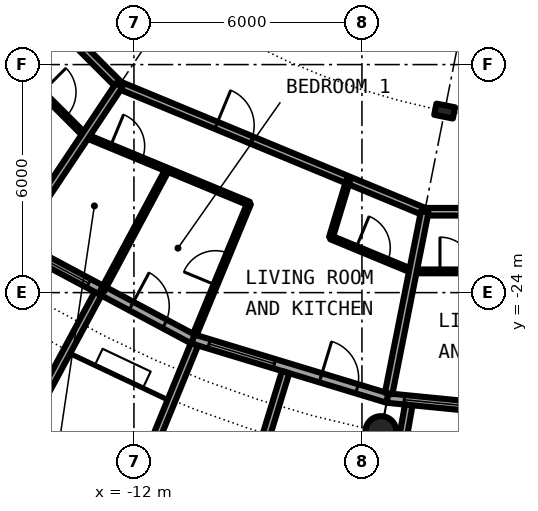
"""IFC4 building model, lengths in metres.
Left out: names, types, materials, properties, quantities, classifications, styles, units other than length and angle.
Written with IfcOpenShell. Run it as: python <this file> out.ifc"""

import sys

from ifc_helpers import new_model, si_unit, direction, frame, frame_2d, origin, origin_2d, place, context, subcontext, project, spatial, rectangle, hollow_circle, i_section, extrude, element, fill, save


model = new_model("IFC4")
c1 = context("Model", 3, precision=1e-05, world=origin(), true_north=direction((0.0, 1.0)))
c2 = subcontext(c1, "Body", "Model", "MODEL_VIEW")
j1 = project(units=[si_unit("LENGTHUNIT", "METRE"), si_unit("PLANEANGLEUNIT", "RADIAN")], contexts=[c1])
p1 = place(None, origin())
s1 = spatial("IfcSite", under=j1, at=p1, CompositionType="ELEMENT")
p2 = place(p1, origin())
s2 = spatial("IfcBuilding", under=s1, at=p2, CompositionType="ELEMENT")
p3 = place(p2, frame((0.0, 0.0, 167.7)))
s3 = spatial("IfcBuildingStorey", under=s2, at=p3, CompositionType="ELEMENT", Elevation=167.7)
p4 = place(p3, frame((-5.501, -27.658, 0.0), z_axis=(0.0, 0.0, 1.0), x_axis=(1.0, 0.0, 0.0)))
e1 = element("IfcColumn", 1, at=p4, inside=s3, PredefinedType="COLUMN", context=c2, shape_type="SweptSolid", body=[
    extrude(hollow_circle(Radius=0.406, WallThickness=0.04, at=origin_2d()), origin(), (0.0, 0.0, 1.0), 3.05),
])
p5 = place(p3, frame((-3.824, -19.223, 0.0), z_axis=(0.0, 0.0, 1.0), x_axis=(-0.195090322016, -0.980785280403, 0.0)))
e2 = element("IfcColumn", 2, at=p5, inside=s3, PredefinedType="COLUMN", context=c2, shape_type="SweptSolid", body=[
    extrude(i_section(OverallWidth=0.3, OverallDepth=0.5, WebThickness=0.014, FlangeThickness=0.028, FilletRadius=0.027, at=origin_2d()), origin(), (0.0, 0.0, 1.0), 3.05),
])
p6 = place(p3, frame((-15.167, -22.699, 0.0), z_axis=(0.0, 0.0, 1.0), x_axis=(0.881915646801, -0.471407246368, 0.0)))
e3 = element("IfcWall", 3, at=p6, inside=s3, PredefinedType="SOLIDWALL", context=c2, shape_type="SweptSolid", body=[
    extrude(rectangle(XDim=5.352, YDim=0.25, at=frame_2d((2.676, 0.0))), origin(), (0.0, 0.0, 1.0), 2.7),
])
p7 = place(p6, frame((0.441, 0.0, 0.3)))
e4 = element("IfcOpeningElement", 4, at=p7, cuts=e3, PredefinedType="OPENING", context=c2, shape_type="SweptSolid", body=[
    extrude(rectangle(XDim=1.8, YDim=2.1, at=frame_2d((0.9, 1.05))), frame((0.0, 0.135, 0.0), z_axis=(0.0, -1.0, 0.0), x_axis=(1.0, 0.0, 0.0)), (0.0, 0.0, 1.0), 0.27),
])
p8 = place(p6, frame((3.51, 0.0, 0.0)))
e5 = element("IfcOpeningElement", 5, at=p8, cuts=e3, PredefinedType="OPENING", context=c2, shape_type="SweptSolid", body=[
    extrude(rectangle(XDim=1.0, YDim=2.2, at=frame_2d((0.5, 1.1))), frame((0.0, 0.135, 0.0), z_axis=(0.0, -1.0, 0.0), x_axis=(1.0, 0.0, 0.0)), (0.0, 0.0, 1.0), 0.27),
])
p9 = place(p3, frame((-12.945, -24.029, -0.03), z_axis=(0.0, 0.0, 1.0), x_axis=(-0.474424310775, -0.88029629861, 0.0)))
e6 = element("IfcWall", 6, at=p9, inside=s3, PredefinedType="SOLIDWALL", context=c2, shape_type="SweptSolid", body=[
    extrude(rectangle(XDim=3.006, YDim=0.2, at=frame_2d((1.503, 0.0))), origin(), (0.0, 0.0, 1.0), 2.73),
])
p10 = place(p3, frame((-10.447, -25.222, 0.0), z_axis=(0.0, 0.0, 1.0), x_axis=(0.956965678721, -0.290201119486, 0.0)))
e7 = element("IfcWall", 7, at=p10, inside=s3, PredefinedType="SOLIDWALL", context=c2, shape_type="SweptSolid", body=[
    extrude(rectangle(XDim=5.351, YDim=0.25, at=frame_2d((2.676, 0.0))), origin(), (0.0, 0.0, 1.0), 2.7),
])
p11 = place(p10, frame((0.441, 0.0, 0.3)))
e8 = element("IfcOpeningElement", 8, at=p11, cuts=e7, PredefinedType="OPENING", context=c2, shape_type="SweptSolid", body=[
    extrude(rectangle(XDim=1.8, YDim=2.1, at=frame_2d((0.9, 1.05))), frame((0.0, 0.135, 0.0), z_axis=(0.0, -1.0, 0.0), x_axis=(1.0, 0.0, 0.0)), (0.0, 0.0, 1.0), 0.27),
])
p12 = place(p10, frame((3.51, 0.0, 0.0)))
e9 = element("IfcOpeningElement", 9, at=p12, cuts=e7, PredefinedType="OPENING", context=c2, shape_type="SweptSolid", body=[
    extrude(rectangle(XDim=1.0, YDim=2.2, at=frame_2d((0.5, 1.1))), frame((0.0, 0.135, 0.0), z_axis=(0.0, -1.0, 0.0), x_axis=(1.0, 0.0, 0.0)), (0.0, 0.0, 1.0), 0.27),
])
p13 = place(p3, frame((-10.409, -25.364, -0.03), z_axis=(0.0, 0.0, 1.0), x_axis=(-0.379509886562, -0.925187681501, 0.0)))
e10 = element("IfcWall", 10, at=p13, inside=s3, PredefinedType="SOLIDWALL", context=c2, shape_type="SweptSolid", body=[
    extrude(rectangle(XDim=2.883, YDim=0.2, at=frame_2d((1.441, 0.0))), origin(), (0.0, 0.0, 1.0), 2.73),
])
p14 = place(p3, frame((-8.009, -26.092, -0.03), z_axis=(0.0, 0.0, 1.0), x_axis=(-0.293406695073, -0.955987715029, 0.0)))
e11 = element("IfcWall", 11, at=p14, inside=s3, PredefinedType="SOLIDWALL", context=c2, shape_type="SweptSolid", body=[
    extrude(rectangle(XDim=3.006, YDim=0.2, at=frame_2d((1.503, 0.0))), origin(), (0.0, 0.0, 1.0), 2.73),
])
p15 = place(p3, frame((-5.326, -26.775, 0.0), z_axis=(0.0, 0.0, 1.0), x_axis=(0.995173996315, -0.098126026407, 0.0)))
e12 = element("IfcWall", 12, at=p15, inside=s3, PredefinedType="SOLIDWALL", context=c2, shape_type="SweptSolid", body=[
    extrude(rectangle(XDim=5.352, YDim=0.25, at=frame_2d((2.676, 0.0))), origin(), (0.0, 0.0, 1.0), 2.7),
])
p16 = place(p15, frame((0.441, 0.0, 0.3)))
e13 = element("IfcOpeningElement", 13, at=p16, cuts=e12, PredefinedType="OPENING", context=c2, shape_type="SweptSolid", body=[
    extrude(rectangle(XDim=1.8, YDim=2.1, at=frame_2d((0.9, 1.05))), frame((0.0, 0.135, 0.0), z_axis=(0.0, -1.0, 0.0), x_axis=(1.0, 0.0, 0.0)), (0.0, 0.0, 1.0), 0.27),
])
p17 = place(p15, frame((3.51, 0.0, 0.0)))
e14 = element("IfcOpeningElement", 14, at=p17, cuts=e12, PredefinedType="OPENING", context=c2, shape_type="SweptSolid", body=[
    extrude(rectangle(XDim=1.0, YDim=2.2, at=frame_2d((0.5, 1.1))), frame((0.0, 0.135, 0.0), z_axis=(0.0, -1.0, 0.0), x_axis=(1.0, 0.0, 0.0)), (0.0, 0.0, 1.0), 0.27),
])
p18 = place(p3, frame((-4.769, -26.956, -0.03), z_axis=(0.0, 0.0, 1.0), x_axis=(-0.174056778901, -0.984735618183, 0.0)))
e15 = element("IfcWall", 15, at=p18, inside=s3, PredefinedType="SOLIDWALL", context=c2, shape_type="SweptSolid", body=[
    extrude(rectangle(XDim=2.925, YDim=0.2, at=frame_2d((1.462, 0.0))), origin(), (0.0, 0.0, 1.0), 2.73),
])
p19 = place(p3, frame((-16.581, -16.571, 0.0), z_axis=(0.0, 0.0, 1.0), x_axis=(0.706923494552, -0.707290020325, 0.0)))
e16 = element("IfcWall", 16, at=p19, inside=s3, PredefinedType="PARTITIONING", context=c2, shape_type="SweptSolid", body=[
    extrude(rectangle(XDim=4.663, YDim=0.1, at=frame_2d((2.331, 0.0))), origin(), (0.0, 0.0, 1.0), 2.7),
])
p20 = place(p19, frame((3.051, 0.0, 0.0)))
e17 = element("IfcOpeningElement", 17, at=p20, cuts=e16, PredefinedType="OPENING", context=c2, shape_type="SweptSolid", body=[
    extrude(rectangle(XDim=0.9, YDim=2.3, at=frame_2d((0.45, 1.15))), frame((0.0, 0.06, 0.0), z_axis=(0.0, -1.0, 0.0), x_axis=(1.0, 0.0, 0.0)), (0.0, 0.0, 1.0), 0.12),
])
p21 = place(p3, frame((-13.278, -19.873, 0.0), z_axis=(0.0, 0.0, 1.0), x_axis=(0.923920484476, -0.38258455061, 0.0)))
e18 = element("IfcWall", 18, at=p21, inside=s3, PredefinedType="PARTITIONING", context=c2, shape_type="SweptSolid", body=[
    extrude(rectangle(XDim=4.663, YDim=0.1, at=frame_2d((2.332, 0.0))), origin(), (0.0, 0.0, 1.0), 2.7),
])
p22 = place(p21, frame((0.715, 0.0, 0.0)))
e19 = element("IfcOpeningElement", 19, at=p22, cuts=e18, PredefinedType="OPENING", context=c2, shape_type="SweptSolid", body=[
    extrude(rectangle(XDim=0.9, YDim=2.3, at=frame_2d((0.45, 1.15))), frame((0.0, 0.06, 0.0), z_axis=(0.0, -1.0, 0.0), x_axis=(1.0, 0.0, 0.0)), (0.0, 0.0, 1.0), 0.12),
])
p23 = place(p3, frame((-6.817, -22.549, 0.0), z_axis=(0.0, 0.0, 1.0), x_axis=(0.923923664861, -0.382576870068, 0.0)))
e20 = element("IfcWall", 20, at=p23, inside=s3, PredefinedType="PARTITIONING", context=c2, shape_type="SweptSolid", body=[
    extrude(rectangle(XDim=2.331, YDim=0.1, at=frame_2d((1.166, 0.0))), origin(), (0.0, 0.0, 1.0), 2.7),
])
p24 = place(p23, frame((0.716, 0.0, 0.0)))
e21 = element("IfcOpeningElement", 21, at=p24, cuts=e20, PredefinedType="OPENING", context=c2, shape_type="SweptSolid", body=[
    extrude(rectangle(XDim=0.9, YDim=2.3, at=frame_2d((0.45, 1.15))), frame((0.0, 0.06, 0.0), z_axis=(0.0, -1.0, 0.0), x_axis=(1.0, 0.0, 0.0)), (0.0, 0.0, 1.0), 0.12),
])
p25 = place(p3, frame((-4.663, -23.441, 0.0), z_axis=(0.0, 0.0, 1.0), x_axis=(1.0, 0.0, 0.0)))
e22 = element("IfcWall", 22, at=p25, inside=s3, PredefinedType="PARTITIONING", context=c2, shape_type="SweptSolid", body=[
    extrude(rectangle(XDim=2.332, YDim=0.1, at=frame_2d((1.166, 0.0))), origin(), (0.0, 0.0, 1.0), 2.7),
])
p26 = place(p25, frame((0.716, 0.0, 0.0)))
e23 = element("IfcOpeningElement", 23, at=p26, cuts=e22, PredefinedType="OPENING", context=c2, shape_type="SweptSolid", body=[
    extrude(rectangle(XDim=0.9, YDim=2.3, at=frame_2d((0.45, 1.15))), frame((0.0, 0.06, 0.0), z_axis=(0.0, -1.0, 0.0), x_axis=(1.0, 0.0, 0.0)), (0.0, 0.0, 1.0), 0.12),
])
p27 = place(p3, frame((-18.542, -12.389, 0.0), z_axis=(0.0, 0.0, 1.0), x_axis=(0.707106781187, -0.707106781187, 0.0)))
e24 = element("IfcWall", 24, at=p27, inside=s3, PredefinedType="PARTITIONING", context=c2, shape_type="SweptSolid", body=[
    extrude(rectangle(XDim=8.702, YDim=0.2, at=frame_2d((4.351, 0.0))), origin(), (0.0, 0.0, 1.0), 2.7),
])
p28 = place(p27, frame((4.938, 0.0, 0.0)))
e25 = element("IfcOpeningElement", 25, at=p28, cuts=e24, PredefinedType="OPENING", context=c2, shape_type="SweptSolid", body=[
    extrude(rectangle(XDim=1.0, YDim=2.3, at=frame_2d((0.5, 1.15))), frame((0.0, 0.11, 0.0), z_axis=(0.0, -1.0, 0.0), x_axis=(1.0, 0.0, 0.0)), (0.0, 0.0, 1.0), 0.22),
])
p29 = place(p3, frame((-12.389, -18.542, 0.0), z_axis=(0.0, 0.0, 1.0), x_axis=(0.923867858178, -0.382711615483, 0.0)))
e26 = element("IfcWall", 26, at=p29, inside=s3, PredefinedType="PARTITIONING", context=c2, shape_type="SweptSolid", body=[
    extrude(rectangle(XDim=8.709, YDim=0.2, at=frame_2d((4.354, 0.0))), origin(), (0.0, 0.0, 1.0), 2.7),
])
p30 = place(p29, frame((2.763, 0.0, 0.0)))
e27 = element("IfcOpeningElement", 27, at=p30, cuts=e26, PredefinedType="OPENING", context=c2, shape_type="SweptSolid", body=[
    extrude(rectangle(XDim=1.0, YDim=2.3, at=frame_2d((0.5, 1.15))), frame((0.0, 0.11, 0.0), z_axis=(0.0, -1.0, 0.0), x_axis=(1.0, 0.0, 0.0)), (0.0, 0.0, 1.0), 0.22),
])
p31 = place(p3, frame((-4.351, -21.872, 0.0), z_axis=(0.0, 0.0, 1.0), x_axis=(1.0, 0.0, 0.0)))
e28 = element("IfcWall", 28, at=p31, inside=s3, PredefinedType="PARTITIONING", context=c2, shape_type="SweptSolid", body=[
    extrude(rectangle(XDim=8.702, YDim=0.2, at=frame_2d((4.351, 0.0))), origin(), (0.0, 0.0, 1.0), 2.7),
])
p32 = place(p31, frame((4.939, 0.0, 0.0)))
e29 = element("IfcOpeningElement", 29, at=p32, cuts=e28, PredefinedType="OPENING", context=c2, shape_type="SweptSolid", body=[
    extrude(rectangle(XDim=1.0, YDim=2.3, at=frame_2d((0.5, 1.15))), frame((0.0, 0.11, 0.0), z_axis=(0.0, -1.0, 0.0), x_axis=(1.0, 0.0, 0.0)), (0.0, 0.0, 1.0), 0.22),
])
p33 = place(p3, frame((-6.817, -22.549, 0.0), z_axis=(0.0, 0.0, 1.0), x_axis=(0.289547780579, 0.957163561134, 0.0)))
e30 = element("IfcWall", 30, at=p33, inside=s3, PredefinedType="PARTITIONING", context=c2, shape_type="SweptSolid", body=[
    extrude(rectangle(XDim=1.578, YDim=0.1, at=frame_2d((0.789, 0.0))), origin(), (0.0, 0.0, 1.0), 2.7),
])
p34 = place(p3, frame((-15.097, -22.596, 0.0), z_axis=(0.0, 0.0, 1.0), x_axis=(0.555462686211, 0.831541462723, 0.0)))
e31 = element("IfcWall", 31, at=p34, inside=s3, PredefinedType="PARTITIONING", context=c2, shape_type="SweptSolid", body=[
    extrude(rectangle(XDim=4.875, YDim=0.2, at=frame_2d((2.438, 0.0))), origin(), (0.0, 0.0, 1.0), 2.7),
])
p35 = place(p3, frame((-12.833, -23.954, 0.0), z_axis=(0.0, 0.0, 1.0), x_axis=(0.472212052488, 0.881484984265, 0.0)))
e32 = element("IfcWall", 32, at=p35, inside=s3, PredefinedType="PARTITIONING", context=c2, shape_type="SweptSolid", body=[
    extrude(rectangle(XDim=3.619, YDim=0.1, at=frame_2d((1.81, 0.0))), origin(), (0.0, 0.0, 1.0), 2.7),
])
p36 = place(p3, frame((-10.399, -25.106, 0.0), z_axis=(0.0, 0.0, 1.0), x_axis=(0.382669377748, 0.923885353999, 0.0)))
e33 = element("IfcWall", 33, at=p36, inside=s3, PredefinedType="PARTITIONING", context=c2, shape_type="SweptSolid", body=[
    extrude(rectangle(XDim=3.734, YDim=0.1, at=frame_2d((1.867, 0.0))), origin(), (0.0, 0.0, 1.0), 2.7),
])
p37 = place(p36, frame((1.417, 0.0, 0.0)))
e34 = element("IfcOpeningElement", 34, at=p37, cuts=e33, PredefinedType="OPENING", context=c2, shape_type="SweptSolid", body=[
    extrude(rectangle(XDim=0.9, YDim=2.3, at=frame_2d((0.45, 1.15))), frame((0.0, 0.06, 0.0), z_axis=(0.0, -1.0, 0.0), x_axis=(1.0, 0.0, 0.0)), (0.0, 0.0, 1.0), 0.12),
])
p38 = place(p3, frame((-5.298, -26.654, 0.0), z_axis=(0.0, 0.0, 1.0), x_axis=(0.194931286287, 0.980816901173, 0.0)))
e35 = element("IfcWall", 35, at=p38, inside=s3, PredefinedType="PARTITIONING", context=c2, shape_type="SweptSolid", body=[
    extrude(rectangle(XDim=4.875, YDim=0.2, at=frame_2d((2.437, 0.0))), origin(), (0.0, 0.0, 1.0), 2.7),
])
p39 = place(p7, origin())
e36 = element("IfcWindow", 36, at=p39, inside=s3, PartitioningType="SINGLE_PANEL", PredefinedType="WINDOW", context=c2, shape_type="SweptSolid", body=[
    extrude(rectangle(XDim=1.8, YDim=2.1, at=frame_2d((0.9, 1.05))), frame((0.0, 0.03, 0.0), z_axis=(0.0, -1.0, 0.0), x_axis=(1.0, 0.0, 0.0)), (0.0, 0.0, 1.0), 0.06),
])
fill(e4, e36)
p40 = place(p8, origin())
e37 = element("IfcDoor", 37, at=p40, inside=s3, OperationType="SINGLE_SWING_LEFT", PredefinedType="DOOR", context=c2, shape_type="SweptSolid", body=[
    extrude(rectangle(XDim=1.0, YDim=2.2, at=frame_2d((0.5, 1.1))), frame((0.0, 0.025, 0.0), z_axis=(0.0, -1.0, 0.0), x_axis=(1.0, 0.0, 0.0)), (0.0, 0.0, 1.0), 0.05),
])
fill(e5, e37)
p41 = place(p11, origin())
e38 = element("IfcWindow", 38, at=p41, inside=s3, PartitioningType="SINGLE_PANEL", PredefinedType="WINDOW", context=c2, shape_type="SweptSolid", body=[
    extrude(rectangle(XDim=1.8, YDim=2.1, at=frame_2d((0.9, 1.05))), frame((0.0, 0.03, 0.0), z_axis=(0.0, -1.0, 0.0), x_axis=(1.0, 0.0, 0.0)), (0.0, 0.0, 1.0), 0.06),
])
fill(e8, e38)
p42 = place(p12, origin())
e39 = element("IfcDoor", 39, at=p42, inside=s3, OperationType="SINGLE_SWING_LEFT", PredefinedType="DOOR", context=c2, shape_type="SweptSolid", body=[
    extrude(rectangle(XDim=1.0, YDim=2.2, at=frame_2d((0.5, 1.1))), frame((0.0, 0.025, 0.0), z_axis=(0.0, -1.0, 0.0), x_axis=(1.0, 0.0, 0.0)), (0.0, 0.0, 1.0), 0.05),
])
fill(e9, e39)
p43 = place(p16, origin())
e40 = element("IfcWindow", 40, at=p43, inside=s3, PartitioningType="SINGLE_PANEL", PredefinedType="WINDOW", context=c2, shape_type="SweptSolid", body=[
    extrude(rectangle(XDim=1.8, YDim=2.1, at=frame_2d((0.9, 1.05))), frame((0.0, 0.03, 0.0), z_axis=(0.0, -1.0, 0.0), x_axis=(1.0, 0.0, 0.0)), (0.0, 0.0, 1.0), 0.06),
])
fill(e13, e40)
p44 = place(p20, origin())
e41 = element("IfcDoor", 41, at=p44, inside=s3, OperationType="SINGLE_SWING_RIGHT", PredefinedType="DOOR", context=c2, shape_type="SweptSolid", body=[
    extrude(rectangle(XDim=0.9, YDim=2.3, at=frame_2d((0.45, 1.15))), frame((0.0, 0.025, 0.0), z_axis=(0.0, -1.0, 0.0), x_axis=(1.0, 0.0, 0.0)), (0.0, 0.0, 1.0), 0.05),
])
fill(e17, e41)
p45 = place(p30, origin())
e42 = element("IfcDoor", 42, at=p45, inside=s3, OperationType="SINGLE_SWING_LEFT", PredefinedType="DOOR", context=c2, shape_type="SweptSolid", body=[
    extrude(rectangle(XDim=1.0, YDim=2.3, at=frame_2d((0.5, 1.15))), frame((0.0, 0.025, 0.0), z_axis=(0.0, -1.0, 0.0), x_axis=(1.0, 0.0, 0.0)), (0.0, 0.0, 1.0), 0.05),
])
fill(e27, e42)
p46 = place(p24, origin())
e43 = element("IfcDoor", 43, at=p46, inside=s3, OperationType="SINGLE_SWING_LEFT", PredefinedType="DOOR", context=c2, shape_type="SweptSolid", body=[
    extrude(rectangle(XDim=0.9, YDim=2.3, at=frame_2d((0.45, 1.15))), frame((0.0, 0.025, 0.0), z_axis=(0.0, -1.0, 0.0), x_axis=(1.0, 0.0, 0.0)), (0.0, 0.0, 1.0), 0.05),
])
fill(e21, e43)
p47 = place(p37, origin())
e44 = element("IfcDoor", 44, at=p47, inside=s3, OperationType="SINGLE_SWING_RIGHT", PredefinedType="DOOR", context=c2, shape_type="SweptSolid", body=[
    extrude(rectangle(XDim=0.9, YDim=2.3, at=frame_2d((0.45, 1.15))), frame((0.0, 0.025, 0.0), z_axis=(0.0, -1.0, 0.0), x_axis=(1.0, 0.0, 0.0)), (0.0, 0.0, 1.0), 0.05),
])
fill(e34, e44)
p48 = place(p22, origin())
e45 = element("IfcDoor", 45, at=p48, inside=s3, OperationType="SINGLE_SWING_LEFT", PredefinedType="DOOR", context=c2, shape_type="SweptSolid", body=[
    extrude(rectangle(XDim=0.9, YDim=2.3, at=frame_2d((0.45, 1.15))), frame((0.0, 0.025, 0.0), z_axis=(0.0, -1.0, 0.0), x_axis=(1.0, 0.0, 0.0)), (0.0, 0.0, 1.0), 0.05),
])
fill(e19, e45)
p49 = place(p26, origin())
e46 = element("IfcDoor", 46, at=p49, inside=s3, OperationType="SINGLE_SWING_RIGHT", PredefinedType="DOOR", context=c2, shape_type="SweptSolid", body=[
    extrude(rectangle(XDim=0.9, YDim=2.3, at=frame_2d((0.45, 1.15))), frame((0.0, 0.025, 0.0), z_axis=(0.0, -1.0, 0.0), x_axis=(1.0, 0.0, 0.0)), (0.0, 0.0, 1.0), 0.05),
])
fill(e23, e46)
save(model, sys.argv[1])
